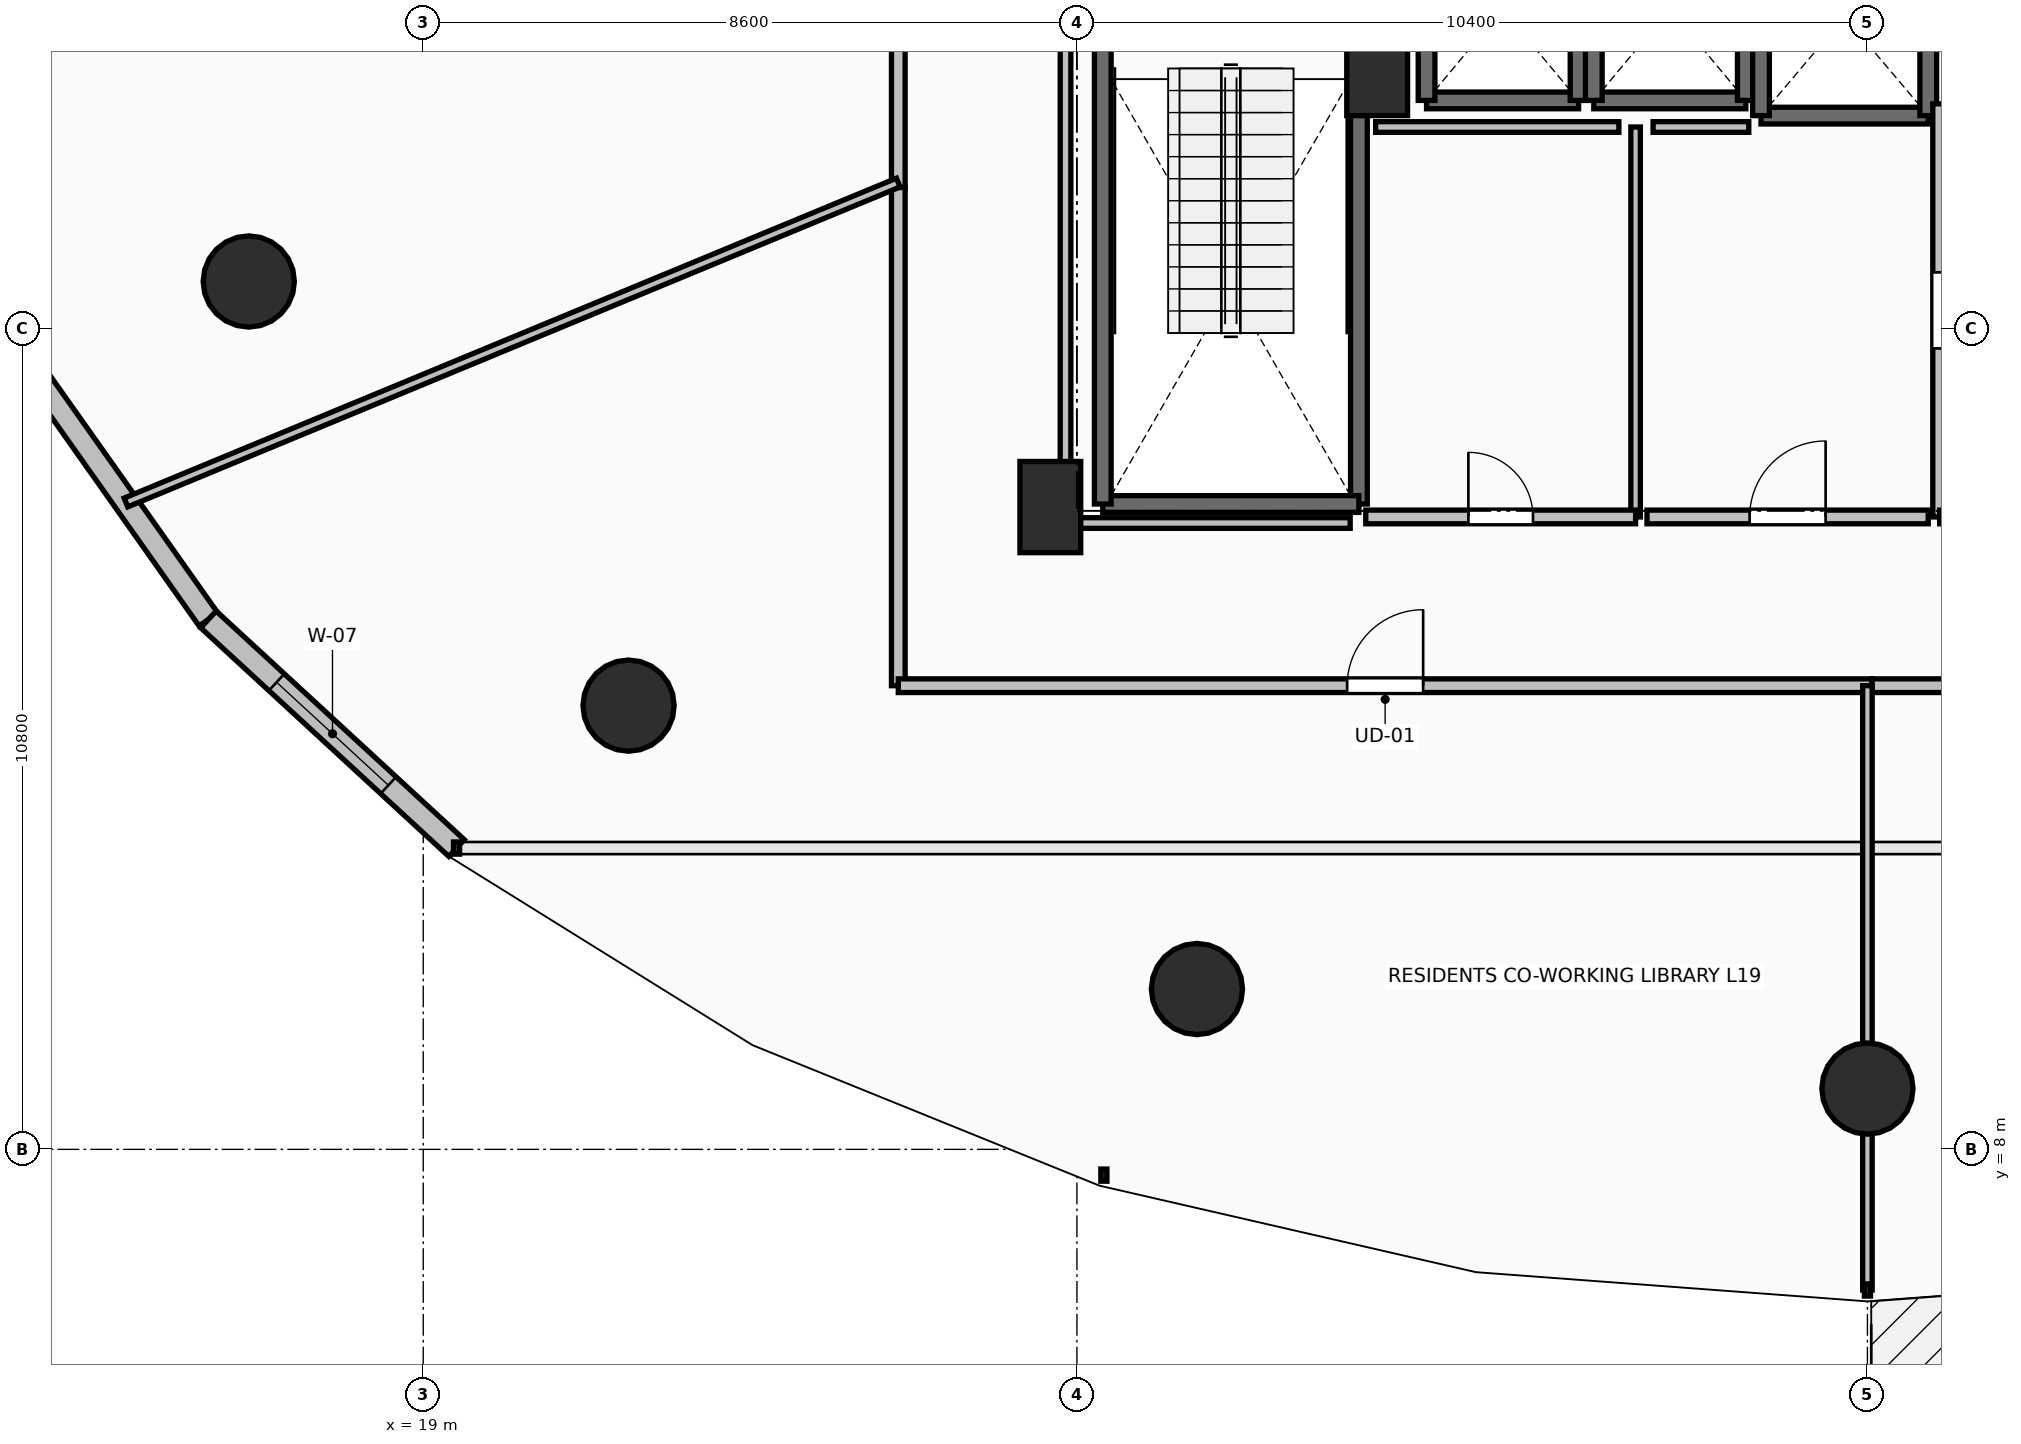
"""IFC4 building model, lengths in metres.
Left out: names, types, materials, properties, quantities, classifications, styles, units other than length and angle.
Written with IfcOpenShell. Run it as: python <this file> out.ifc"""

import sys

from ifc_helpers import new_model, si_unit, direction, frame, frame_2d, origin, origin_2d, place, context, subcontext, project, spatial, rectangle, circle, extrude, element, fill, save


model = new_model("IFC4")
c1 = context("Model", 3, precision=1e-05, world=origin(), true_north=direction((0.0, 1.0)))
c2 = subcontext(c1, "Body", "Model", "MODEL_VIEW")
j1 = project(units=[si_unit("LENGTHUNIT", "METRE"), si_unit("PLANEANGLEUNIT", "RADIAN")], contexts=[c1])
p1 = place(None, origin())
s1 = spatial("IfcSite", under=j1, at=p1, CompositionType="ELEMENT")
p2 = place(p1, origin())
s2 = spatial("IfcBuilding", under=s1, at=p2, CompositionType="ELEMENT")
p3 = place(p2, frame((0.0, 0.0, 74.3)))
s3 = spatial("IfcBuildingStorey", under=s2, at=p3, CompositionType="ELEMENT", Elevation=74.3)
for number, where, z_axis, x_axis in (
    (1, (16.705, 19.418, 0.0), (0.0, 0.0, 1.0), (-0.924, -0.383, 0.0)),
    (2, (21.701, 13.838, 0.0), (0.0, 0.0, 1.0), (-0.707, -0.707, 0.0)),
    (3, (29.179, 10.109, 0.0), (0.0, 0.0, 1.0), (-0.383, -0.924, 0.0)),
    (4, (38.0, 8.8, 0.0), (0.0, 0.0, 1.0), (0.0, -1.0, 0.0)),
):
    element("IfcColumn", number, at=place(p3, frame(where, z_axis=z_axis, x_axis=x_axis)), inside=s3, PredefinedType="COLUMN", context=c2, shape_type="SweptSolid", body=[
        extrude(circle(Radius=0.6, at=origin_2d()), origin(), (0.0, 0.0, 1.0), 4.5),
    ])
for number, where, z_axis, x_axis in (
    (5, (27.25, 16.45, 0.0), (0.0, 0.0, 1.0), (1.0, 0.0, 0.0)),
    (6, (31.55, 22.2, 0.0), (0.0, 0.0, 1.0), (1.0, 0.0, 0.0)),
):
    element("IfcColumn", number, at=place(p3, frame(where, z_axis=z_axis, x_axis=x_axis)), inside=s3, PredefinedType="PILASTER", context=c2, shape_type="SweptSolid", body=[
        extrude(rectangle(XDim=0.8, YDim=1.2, at=origin_2d()), origin(), (0.0, 0.0, 1.0), 4.5),
    ])
p4 = place(p3, frame((13.748, 18.404, 0.0), z_axis=(0.0, 0.0, 1.0), x_axis=(0.57716435238, -0.81662801222, 0.0)))
e7 = element("IfcWall", 7, at=p4, inside=s3, PredefinedType="STANDARD", context=c2, shape_type="SweptSolid", body=[
    extrude(rectangle(XDim=4.202, YDim=0.3, at=frame_2d((2.101, 0.0))), origin(), (0.0, 0.0, 1.0), 4.24),
])
p5 = place(p3, frame((16.174, 14.972, 0.0), z_axis=(0.0, 0.0, 1.0), x_axis=(0.735416718093, -0.677615119924, 0.0)))
e8 = element("IfcWall", 8, at=p5, inside=s3, PredefinedType="STANDARD", context=c2, shape_type="SweptSolid", body=[
    extrude(rectangle(XDim=4.439, YDim=0.3, at=frame_2d((2.22, 0.0))), origin(), (0.0, 0.0, 1.0), 4.24),
])
p6 = place(p5, frame((1.219, 0.0, 0.85)))
e9 = element("IfcOpeningElement", 9, at=p6, cuts=e8, PredefinedType="OPENING", context=c2, shape_type="SweptSolid", body=[
    extrude(rectangle(XDim=2.0, YDim=2.45, at=frame_2d((1.0, 1.225))), frame((0.0, 0.165, 0.0), z_axis=(0.0, -1.0, 0.0), x_axis=(1.0, 0.0, 0.0)), (0.0, 0.0, 1.0), 0.33),
])
p7 = place(p3, frame((31.31, 23.91, 0.0), z_axis=(0.0, 0.0, 1.0), x_axis=(0.0, -1.0, 0.0)))
e10 = element("IfcWall", 10, at=p7, inside=s3, PredefinedType="SOLIDWALL", context=c2, shape_type="SweptSolid", body=[
    extrude(rectangle(XDim=7.42, YDim=0.22, at=frame_2d((3.71, 0.0))), origin(), (0.0, 0.0, 1.0), 4.24),
])
p8 = place(p3, frame((31.31, 16.49, 0.0), z_axis=(0.0, 0.0, 1.0), x_axis=(-1.0, 0.0, 0.0)))
e11 = element("IfcWall", 11, at=p8, inside=s3, PredefinedType="SOLIDWALL", context=c2, shape_type="SweptSolid", body=[
    extrude(rectangle(XDim=3.37, YDim=0.22, at=frame_2d((1.685, 0.0))), origin(), (0.0, 0.0, 1.0), 4.24),
])
p9 = place(p3, frame((27.94, 16.49, 0.0), z_axis=(0.0, 0.0, 1.0), x_axis=(0.0, 1.0, 0.0)))
e12 = element("IfcWall", 12, at=p9, inside=s3, PredefinedType="SOLIDWALL", context=c2, shape_type="SweptSolid", body=[
    extrude(rectangle(XDim=7.42, YDim=0.22, at=frame_2d((3.71, 0.0))), origin(), (0.0, 0.0, 1.0), 4.24),
])
p10 = place(p3, frame((32.2, 21.8, 0.0), z_axis=(0.0, 0.0, 1.0), x_axis=(1.0, 0.0, 0.0)))
e13 = element("IfcWall", 13, at=p10, inside=s3, PredefinedType="SOLIDWALL", context=c2, shape_type="SweptSolid", body=[
    extrude(rectangle(XDim=2.0, YDim=0.22, at=frame_2d((1.0, 0.0))), origin(), (0.0, 0.0, 1.0), 4.24),
])
for number, where, z_axis, x_axis in (
    (14, (34.2, 21.8, 0.0), (0.0, 0.0, 1.0), (0.0, 1.0, 0.0)),
    (15, (32.2, 24.2, 0.0), (0.0, 0.0, 1.0), (0.0, -1.0, 0.0)),
):
    element("IfcWall", number, at=place(p3, frame(where, z_axis=z_axis, x_axis=x_axis)), inside=s3, PredefinedType="SOLIDWALL", context=c2, shape_type="SweptSolid", body=[
        extrude(rectangle(XDim=2.4, YDim=0.22, at=frame_2d((1.2, 0.0))), origin(), (0.0, 0.0, 1.0), 4.24),
    ])
p11 = place(p3, frame((34.4, 21.8, 0.0), z_axis=(0.0, 0.0, 1.0), x_axis=(1.0, 0.0, 0.0)))
e16 = element("IfcWall", 16, at=p11, inside=s3, PredefinedType="SOLIDWALL", context=c2, shape_type="SweptSolid", body=[
    extrude(rectangle(XDim=2.0, YDim=0.22, at=frame_2d((1.0, 0.0))), origin(), (0.0, 0.0, 1.0), 4.24),
])
for number, where, z_axis, x_axis in (
    (17, (36.4, 21.8, 0.0), (0.0, 0.0, 1.0), (0.0, 1.0, 0.0)),
    (18, (34.4, 24.2, 0.0), (0.0, 0.0, 1.0), (0.0, -1.0, 0.0)),
):
    element("IfcWall", number, at=place(p3, frame(where, z_axis=z_axis, x_axis=x_axis)), inside=s3, PredefinedType="SOLIDWALL", context=c2, shape_type="SweptSolid", body=[
        extrude(rectangle(XDim=2.4, YDim=0.22, at=frame_2d((1.2, 0.0))), origin(), (0.0, 0.0, 1.0), 4.24),
    ])
p12 = place(p3, frame((36.6, 21.6, 0.0), z_axis=(0.0, 0.0, 1.0), x_axis=(1.0, 0.0, 0.0)))
e19 = element("IfcWall", 19, at=p12, inside=s3, PredefinedType="SOLIDWALL", context=c2, shape_type="SweptSolid", body=[
    extrude(rectangle(XDim=2.2, YDim=0.22, at=frame_2d((1.1, 0.0))), origin(), (0.0, 0.0, 1.0), 4.24),
])
for number, where, z_axis, x_axis in (
    (20, (38.8, 21.6, 0.0), (0.0, 0.0, 1.0), (0.0, 1.0, 0.0)),
    (21, (36.6, 24.2, 0.0), (0.0, 0.0, 1.0), (0.0, -1.0, 0.0)),
):
    element("IfcWall", number, at=place(p3, frame(where, z_axis=z_axis, x_axis=x_axis)), inside=s3, PredefinedType="SOLIDWALL", context=c2, shape_type="SweptSolid", body=[
        extrude(rectangle(XDim=2.6, YDim=0.22, at=frame_2d((1.3, 0.0))), origin(), (0.0, 0.0, 1.0), 4.24),
    ])
p13 = place(p3, frame((38.95, 21.755, 0.0), z_axis=(0.0, 0.0, 1.0), x_axis=(0.0, -1.0, 0.0)))
e22 = element("IfcWall", 22, at=p13, inside=s3, PredefinedType="PARTITIONING", context=c2, shape_type="SweptSolid", body=[
    extrude(rectangle(XDim=5.435, YDim=0.18, at=frame_2d((2.717, 0.0))), origin(), (0.0, 0.0, 1.0), 4.24),
])
p14 = place(p13, frame((2.218, 0.0, 0.0)))
e23 = element("IfcOpeningElement", 23, at=p14, cuts=e22, PredefinedType="OPENING", context=c2, shape_type="SweptSolid", body=[
    extrude(rectangle(XDim=1.0, YDim=2.15, at=frame_2d((0.5, 1.075))), frame((0.0, 0.105, 0.0), z_axis=(0.0, -1.0, 0.0), x_axis=(1.0, 0.0, 0.0)), (0.0, 0.0, 1.0), 0.21),
])
p15 = place(p3, frame((38.95, 16.32, 0.0), z_axis=(0.0, 0.0, 1.0), x_axis=(1.0, 0.0, 0.0)))
e24 = element("IfcWall", 24, at=p15, inside=s3, PredefinedType="PARTITIONING", context=c2, shape_type="SweptSolid", body=[
    extrude(rectangle(XDim=2.3, YDim=0.18, at=frame_2d((1.15, 0.0))), origin(), (0.0, 0.0, 1.0), 4.24),
])
p16 = place(p15, frame((0.55, 0.0, 0.0)))
e25 = element("IfcOpeningElement", 25, at=p16, cuts=e24, PredefinedType="OPENING", context=c2, shape_type="SweptSolid", body=[
    extrude(rectangle(XDim=1.2, YDim=2.15, at=frame_2d((0.6, 1.075))), frame((0.0, 0.105, 0.0), z_axis=(0.0, -1.0, 0.0), x_axis=(1.0, 0.0, 0.0)), (0.0, 0.0, 1.0), 0.21),
])
p17 = place(p3, frame((34.95, 16.32, 0.0), z_axis=(0.0, 0.0, 1.0), x_axis=(0.0, 1.0, 0.0)))
e26 = element("IfcWall", 26, at=p17, inside=s3, PredefinedType="PARTITIONING", context=c2, shape_type="SweptSolid", body=[
    extrude(rectangle(XDim=5.13, YDim=0.125, at=frame_2d((2.565, 0.0))), origin(), (0.0, 0.0, 1.0), 4.24),
])
p18 = place(p3, frame((31.4, 16.32, 0.0), z_axis=(0.0, 0.0, 1.0), x_axis=(1.0, 0.0, 0.0)))
e27 = element("IfcWall", 27, at=p18, inside=s3, PredefinedType="PARTITIONING", context=c2, shape_type="SweptSolid", body=[
    extrude(rectangle(XDim=3.55, YDim=0.18, at=frame_2d((1.775, 0.0))), origin(), (0.0, 0.0, 1.0), 4.24),
])
p19 = place(p18, frame((1.35, 0.0, 0.0)))
e28 = element("IfcOpeningElement", 28, at=p19, cuts=e27, PredefinedType="OPENING", context=c2, shape_type="SweptSolid", body=[
    extrude(rectangle(XDim=0.85, YDim=2.1, at=frame_2d((0.425, 1.05))), frame((0.0, 0.105, 0.0), z_axis=(0.0, -1.0, 0.0), x_axis=(1.0, 0.0, 0.0)), (0.0, 0.0, 1.0), 0.21),
])
p20 = place(p3, frame((35.1, 16.32, 0.0), z_axis=(0.0, 0.0, 1.0), x_axis=(1.0, 0.0, 0.0)))
e29 = element("IfcWall", 29, at=p20, inside=s3, PredefinedType="PARTITIONING", context=c2, shape_type="SweptSolid", body=[
    extrude(rectangle(XDim=3.7, YDim=0.18, at=frame_2d((1.85, 0.0))), origin(), (0.0, 0.0, 1.0), 4.24),
])
p21 = place(p20, frame((1.35, 0.0, 0.0)))
e30 = element("IfcOpeningElement", 30, at=p21, cuts=e29, PredefinedType="OPENING", context=c2, shape_type="SweptSolid", body=[
    extrude(rectangle(XDim=1.0, YDim=2.15, at=frame_2d((0.5, 1.075))), frame((0.0, 0.105, 0.0), z_axis=(0.0, -1.0, 0.0), x_axis=(1.0, 0.0, 0.0)), (0.0, 0.0, 1.0), 0.21),
])
p22 = place(p3, frame((25.25, 35.95, 0.0), z_axis=(0.0, 0.0, 1.0), x_axis=(0.0, -1.0, 0.0)))
e31 = element("IfcWall", 31, at=p22, inside=s3, PredefinedType="PARTITIONING", context=c2, shape_type="SweptSolid", body=[
    extrude(rectangle(XDim=15.296, YDim=0.18, at=frame_2d((7.648, 0.0))), origin(), (0.0, 0.0, 1.0), 3.432),
])
p23 = place(p22, frame((7.148, 0.0, 0.0)))
e32 = element("IfcOpeningElement", 32, at=p23, cuts=e31, PredefinedType="OPENING", context=c2, shape_type="SweptSolid", body=[
    extrude(rectangle(XDim=1.0, YDim=2.15, at=frame_2d((0.5, 1.075))), frame((0.0, 0.105, 0.0), z_axis=(0.0, -1.0, 0.0), x_axis=(1.0, 0.0, 0.0)), (0.0, 0.0, 1.0), 0.21),
])
p24 = place(p3, frame((25.25, 20.654, 0.0), z_axis=(0.0, 0.0, 1.0), x_axis=(0.0, -1.0, 0.0)))
e33 = element("IfcWall", 33, at=p24, inside=s3, PredefinedType="PARTITIONING", context=c2, shape_type="SweptSolid", body=[
    extrude(rectangle(XDim=6.554, YDim=0.18, at=frame_2d((3.277, 0.0))), origin(), (0.0, 0.0, 1.0), 3.432),
])
p25 = place(p3, frame((25.25, 14.1, 0.0), z_axis=(0.0, 0.0, 1.0), x_axis=(1.0, 0.0, 0.0)))
e34 = element("IfcWall", 34, at=p25, inside=s3, PredefinedType="PARTITIONING", context=c2, shape_type="SweptSolid", body=[
    extrude(rectangle(XDim=12.81, YDim=0.18, at=frame_2d((6.405, 0.0))), origin(), (0.0, 0.0, 1.0), 3.432),
])
p26 = place(p25, frame((5.905, 0.0, 0.0)))
e35 = element("IfcOpeningElement", 35, at=p26, cuts=e34, PredefinedType="OPENING", context=c2, shape_type="SweptSolid", body=[
    extrude(rectangle(XDim=1.0, YDim=2.15, at=frame_2d((0.5, 1.075))), frame((0.0, 0.105, 0.0), z_axis=(0.0, -1.0, 0.0), x_axis=(1.0, 0.0, 0.0)), (0.0, 0.0, 1.0), 0.21),
])
p27 = place(p3, frame((38.06, 14.1, 0.0), z_axis=(0.0, 0.0, 1.0), x_axis=(1.0, 0.0, 0.0)))
e36 = element("IfcWall", 36, at=p27, inside=s3, PredefinedType="PARTITIONING", context=c2, shape_type="SweptSolid", body=[
    extrude(rectangle(XDim=4.14, YDim=0.18, at=frame_2d((2.07, 0.0))), origin(), (0.0, 0.0, 1.0), 3.922),
])
p28 = place(p3, frame((15.089, 16.51, 0.0), z_axis=(0.0, 0.0, 1.0), x_axis=(0.923872894692, 0.382699457086, 0.0)))
e37 = element("IfcWall", 37, at=p28, inside=s3, PredefinedType="PARTITIONING", context=c2, shape_type="SweptSolid", body=[
    extrude(rectangle(XDim=10.998, YDim=0.125, at=frame_2d((5.499, 0.0))), origin(), (0.0, 0.0, 1.0), 3.432),
])
p29 = place(p3, frame((38.0, 6.15, 0.0), z_axis=(0.0, 0.0, 1.0), x_axis=(0.0, 1.0, 0.0)))
e38 = element("IfcWall", 38, at=p29, inside=s3, PredefinedType="PARTITIONING", context=c2, shape_type="SweptSolid", body=[
    extrude(rectangle(XDim=7.95, YDim=0.125, at=frame_2d((3.975, 0.0))), origin(), (0.0, 0.0, 1.0), 3.874),
])
p30 = place(p3, frame((34.73, 21.45, 0.0), z_axis=(0.0, 0.0, 1.0), x_axis=(-1.0, 0.0, 0.0)))
e39 = element("IfcWall", 39, at=p30, inside=s3, PredefinedType="PARTITIONING", context=c2, shape_type="SweptSolid", body=[
    extrude(rectangle(XDim=3.2, YDim=0.14, at=frame_2d((1.6, 0.0))), origin(), (0.0, 0.0, 1.0), 4.24),
])
p31 = place(p3, frame((36.439, 21.45, 0.0), z_axis=(0.0, 0.0, 1.0), x_axis=(-1.0, 0.0, 0.0)))
e40 = element("IfcWall", 40, at=p31, inside=s3, PredefinedType="PARTITIONING", context=c2, shape_type="SweptSolid", body=[
    extrude(rectangle(XDim=1.259, YDim=0.14, at=frame_2d((0.629, 0.0))), origin(), (0.0, 0.0, 1.0), 4.24),
])
p32 = place(p3, frame((31.195, 16.24, 0.0), z_axis=(0.0, 0.0, 1.0), x_axis=(-1.0, 0.0, 0.0)))
e41 = element("IfcWall", 41, at=p32, inside=s3, PredefinedType="PARTITIONING", context=c2, shape_type="SweptSolid", body=[
    extrude(rectangle(XDim=3.745, YDim=0.14, at=frame_2d((1.873, 0.0))), origin(), (0.0, 0.0, 1.0), 3.432),
])
p33 = place(p3, frame((27.45, 16.24, 0.0), z_axis=(0.0, 0.0, 1.0), x_axis=(0.0, 1.0, 0.0)))
e42 = element("IfcWall", 42, at=p33, inside=s3, PredefinedType="PARTITIONING", context=c2, shape_type="SweptSolid", body=[
    extrude(rectangle(XDim=7.514, YDim=0.14, at=frame_2d((3.757, 0.0))), origin(), (0.0, 0.0, 1.0), 3.432),
])
p34 = place(p6, origin())
e43 = element("IfcWindow", 43, at=p34, inside=s3, PartitioningType="SINGLE_PANEL", PredefinedType="WINDOW", context=c2, shape_type="SweptSolid", body=[
    extrude(rectangle(XDim=2.0, YDim=2.45, at=frame_2d((1.0, 1.225))), frame((0.0, 0.03, 0.0), z_axis=(0.0, -1.0, 0.0), x_axis=(1.0, 0.0, 0.0)), (0.0, 0.0, 1.0), 0.06),
])
fill(e9, e43)
p35 = place(p14, origin())
e44 = element("IfcDoor", 44, at=p35, inside=s3, OperationType="SINGLE_SWING_RIGHT", PredefinedType="DOOR", context=c2, shape_type="SweptSolid", body=[
    extrude(rectangle(XDim=1.0, YDim=2.15, at=frame_2d((0.5, 1.075))), frame((0.0, 0.025, 0.0), z_axis=(0.0, -1.0, 0.0), x_axis=(1.0, 0.0, 0.0)), (0.0, 0.0, 1.0), 0.05),
])
fill(e23, e44)
p36 = place(p19, origin())
e45 = element("IfcDoor", 45, at=p36, inside=s3, OperationType="SINGLE_SWING_LEFT", PredefinedType="DOOR", context=c2, shape_type="SweptSolid", body=[
    extrude(rectangle(XDim=0.85, YDim=2.1, at=frame_2d((0.425, 1.05))), frame((0.0, 0.025, 0.0), z_axis=(0.0, -1.0, 0.0), x_axis=(1.0, 0.0, 0.0)), (0.0, 0.0, 1.0), 0.05),
])
fill(e28, e45)
p37 = place(p21, origin())
e46 = element("IfcDoor", 46, at=p37, inside=s3, OperationType="SINGLE_SWING_RIGHT", PredefinedType="DOOR", context=c2, shape_type="SweptSolid", body=[
    extrude(rectangle(XDim=1.0, YDim=2.15, at=frame_2d((0.5, 1.075))), frame((0.0, 0.025, 0.0), z_axis=(0.0, -1.0, 0.0), x_axis=(1.0, 0.0, 0.0)), (0.0, 0.0, 1.0), 0.05),
])
fill(e30, e46)
p38 = place(p26, origin())
e47 = element("IfcDoor", 47, at=p38, inside=s3, OperationType="SINGLE_SWING_RIGHT", PredefinedType="DOOR", context=c2, shape_type="SweptSolid", body=[
    extrude(rectangle(XDim=1.0, YDim=2.15, at=frame_2d((0.5, 1.075))), frame((0.0, 0.025, 0.0), z_axis=(0.0, -1.0, 0.0), x_axis=(1.0, 0.0, 0.0)), (0.0, 0.0, 1.0), 0.05),
])
fill(e35, e47)
save(model, sys.argv[1])
